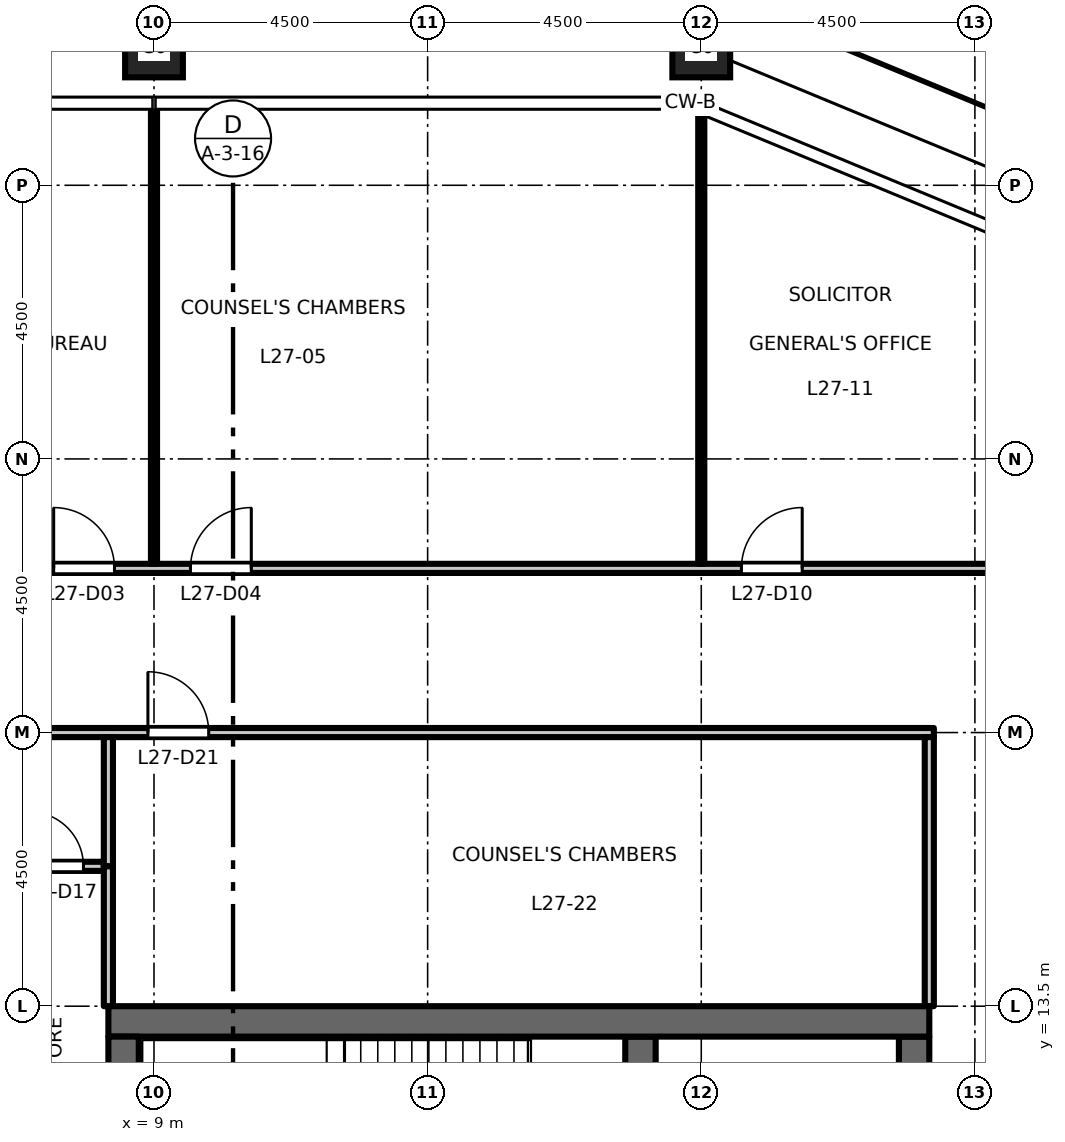
"""IFC4 building model, lengths in metres.
Left out: names, types, materials, properties, quantities, classifications, styles, units other than length and angle.
Written with IfcOpenShell. Run it as: python <this file> out.ifc"""

import sys

from ifc_helpers import new_model, si_unit, direction, frame, frame_2d, origin, origin_2d, place, context, subcontext, project, spatial, rectangle, hollow_rectangle, extrude, element, fill, save


model = new_model("IFC4")
c1 = context("Model", 3, precision=1e-05, world=origin(), true_north=direction((0.0, 1.0)))
c2 = subcontext(c1, "Body", "Model", "MODEL_VIEW")
j1 = project(units=[si_unit("LENGTHUNIT", "METRE"), si_unit("PLANEANGLEUNIT", "RADIAN")], contexts=[c1])
p1 = place(None, origin())
s1 = spatial("IfcSite", under=j1, at=p1, CompositionType="ELEMENT")
p2 = place(p1, origin())
s2 = spatial("IfcBuilding", under=s1, at=p2, CompositionType="ELEMENT")
p3 = place(p2, frame((0.0, 0.0, 127.2)))
s3 = spatial("IfcBuildingStorey", under=s2, at=p3, CompositionType="ELEMENT", Elevation=127.2)
for number, where, z_axis, x_axis in (
    (1, (18.0, 29.25, 0.0), (0.0, 0.0, 1.0), (1.0, 0.0, 0.0)),
    (2, (9.0, 29.25, 0.0), (0.0, 0.0, 1.0), (1.0, 0.0, 0.0)),
):
    element("IfcColumn", number, at=place(p3, frame(where, z_axis=z_axis, x_axis=x_axis)), inside=s3, PredefinedType="COLUMN", context=c2, shape_type="SweptSolid", body=[
        extrude(hollow_rectangle(XDim=0.95, YDim=0.95, WallThickness=0.055, at=origin_2d()), origin(), (0.0, 0.0, 1.0), 4.5),
    ])
p4 = place(p3, frame((21.5, -13.0, 0.0), z_axis=(0.0, 0.0, 1.0), x_axis=(0.0, 1.0, 0.0)))
e3 = element("IfcWall", 3, at=p4, inside=s3, PredefinedType="SHEAR", context=c2, shape_type="SweptSolid", body=[
    extrude(rectangle(XDim=26.0, YDim=0.5, at=frame_2d((13.0, 0.0))), origin(), (0.0, 0.0, 1.0), 4.35),
])
p5 = place(p4, frame((16.825, 0.0, 0.0)))
e4 = element("IfcOpeningElement", 4, at=p5, cuts=e3, PredefinedType="OPENING", context=c2, shape_type="SweptSolid", body=[
    extrude(rectangle(XDim=1.8, YDim=2.1, at=frame_2d((0.9, 1.05))), frame((0.0, 0.26, 0.0), z_axis=(0.0, -1.0, 0.0), x_axis=(1.0, 0.0, 0.0)), (0.0, 0.0, 1.0), 0.52),
])
p6 = place(p4, frame((7.375, 0.0, 0.0)))
e5 = element("IfcOpeningElement", 5, at=p6, cuts=e3, PredefinedType="OPENING", context=c2, shape_type="SweptSolid", body=[
    extrude(rectangle(XDim=1.8, YDim=2.1, at=frame_2d((0.9, 1.05))), frame((0.0, 0.26, 0.0), z_axis=(0.0, -1.0, 0.0), x_axis=(1.0, 0.0, 0.0)), (0.0, 0.0, 1.0), 0.52),
])
p7 = place(p4, frame((1.3, 0.0, 0.0)))
e6 = element("IfcOpeningElement", 6, at=p7, cuts=e3, PredefinedType="OPENING", context=c2, shape_type="SweptSolid", body=[
    extrude(rectangle(XDim=0.9, YDim=2.1, at=frame_2d((0.45, 1.05))), frame((0.0, 0.26, 0.0), z_axis=(0.0, -1.0, 0.0), x_axis=(1.0, 0.0, 0.0)), (0.0, 0.0, 1.0), 0.52),
])
p8 = place(p3, frame((17.0, 6.425, 0.0), z_axis=(0.0, 0.0, 1.0), x_axis=(0.0, 1.0, 0.0)))
e7 = element("IfcWall", 7, at=p8, inside=s3, PredefinedType="SHEAR", context=c2, shape_type="SweptSolid", body=[
    extrude(rectangle(XDim=6.575, YDim=0.5, at=frame_2d((3.288, 0.0))), origin(), (0.0, 0.0, 1.0), 4.35),
])
p9 = place(p3, frame((8.25, 13.25, 0.0), z_axis=(0.0, 0.0, 1.0), x_axis=(1.0, 0.0, 0.0)))
e8 = element("IfcWall", 8, at=p9, inside=s3, PredefinedType="SHEAR", context=c2, shape_type="SweptSolid", body=[
    extrude(rectangle(XDim=13.5, YDim=0.5, at=frame_2d((6.75, 0.0))), origin(), (0.0, 0.0, 1.0), 4.35),
])
p10 = place(p3, frame((8.5, -13.0, 0.0), z_axis=(0.0, 0.0, 1.0), x_axis=(0.0, 1.0, 0.0)))
e9 = element("IfcWall", 9, at=p10, inside=s3, PredefinedType="SHEAR", context=c2, shape_type="SweptSolid", body=[
    extrude(rectangle(XDim=26.0, YDim=0.5, at=frame_2d((13.0, 0.0))), origin(), (0.0, 0.0, 1.0), 4.35),
])
p11 = place(p3, frame((6.54, 15.8, 0.0), z_axis=(0.0, 0.0, 1.0), x_axis=(1.0, 0.0, 0.0)))
e10 = element("IfcWall", 10, at=p11, inside=s3, PredefinedType="PARTITIONING", context=c2, shape_type="SweptSolid", body=[
    extrude(rectangle(XDim=1.635, YDim=0.15, at=frame_2d((0.817, 0.0))), origin(), (0.0, 0.0, 1.0), 4.35),
])
p12 = place(p11, frame((0.4, 0.0, 0.0)))
e11 = element("IfcOpeningElement", 11, at=p12, cuts=e10, PredefinedType="OPENING", context=c2, shape_type="SweptSolid", body=[
    extrude(rectangle(XDim=0.9, YDim=2.1, at=frame_2d((0.45, 1.05))), frame((0.0, 0.085, 0.0), z_axis=(0.0, -1.0, 0.0), x_axis=(1.0, 0.0, 0.0)), (0.0, 0.0, 1.0), 0.17),
])
p13 = place(p3, frame((-21.825, 18.0, 0.0), z_axis=(0.0, 0.0, 1.0), x_axis=(1.0, 0.0, 0.0)))
e12 = element("IfcWall", 12, at=p13, inside=s3, PredefinedType="PARTITIONING", context=c2, shape_type="SweptSolid", body=[
    extrude(rectangle(XDim=43.65, YDim=0.15, at=frame_2d((21.825, 0.0))), origin(), (0.0, 0.0, 1.0), 4.35),
])
p14 = place(p13, frame((14.225, 0.0, 0.0)))
e13 = element("IfcOpeningElement", 13, at=p14, cuts=e12, PredefinedType="OPENING", context=c2, shape_type="SweptSolid", body=[
    extrude(rectangle(XDim=1.0, YDim=2.1, at=frame_2d((0.5, 1.05))), frame((0.0, 0.085, 0.0), z_axis=(0.0, -1.0, 0.0), x_axis=(1.0, 0.0, 0.0)), (0.0, 0.0, 1.0), 0.17),
])
p15 = place(p13, frame((11.975, 0.0, 0.0)))
e14 = element("IfcOpeningElement", 14, at=p15, cuts=e12, PredefinedType="OPENING", context=c2, shape_type="SweptSolid", body=[
    extrude(rectangle(XDim=1.0, YDim=2.1, at=frame_2d((0.5, 1.05))), frame((0.0, 0.085, 0.0), z_axis=(0.0, -1.0, 0.0), x_axis=(1.0, 0.0, 0.0)), (0.0, 0.0, 1.0), 0.17),
])
p16 = place(p13, frame((30.725, 0.0, 0.0)))
e15 = element("IfcOpeningElement", 15, at=p16, cuts=e12, PredefinedType="OPENING", context=c2, shape_type="SweptSolid", body=[
    extrude(rectangle(XDim=1.0, YDim=2.1, at=frame_2d((0.5, 1.05))), frame((0.0, 0.085, 0.0), z_axis=(0.0, -1.0, 0.0), x_axis=(1.0, 0.0, 0.0)), (0.0, 0.0, 1.0), 0.17),
])
p17 = place(p3, frame((-27.06, 20.7, 0.0), z_axis=(0.0, 0.0, 1.0), x_axis=(1.0, 0.0, 0.0)))
e16 = element("IfcWall", 16, at=p17, inside=s3, PredefinedType="PARTITIONING", context=c2, shape_type="SweptSolid", body=[
    extrude(rectangle(XDim=54.12, YDim=0.15, at=frame_2d((27.06, 0.0))), origin(), (0.0, 0.0, 1.0), 4.35),
])
p18 = place(p17, frame((16.41, 0.0, 0.0)))
e17 = element("IfcOpeningElement", 17, at=p18, cuts=e16, PredefinedType="OPENING", context=c2, shape_type="SweptSolid", body=[
    extrude(rectangle(XDim=1.0, YDim=2.1, at=frame_2d((0.5, 1.05))), frame((0.0, 0.085, 0.0), z_axis=(0.0, -1.0, 0.0), x_axis=(1.0, 0.0, 0.0)), (0.0, 0.0, 1.0), 0.17),
])
p19 = place(p17, frame((18.66, 0.0, 0.0)))
e18 = element("IfcOpeningElement", 18, at=p19, cuts=e16, PredefinedType="OPENING", context=c2, shape_type="SweptSolid", body=[
    extrude(rectangle(XDim=1.0, YDim=2.1, at=frame_2d((0.5, 1.05))), frame((0.0, 0.085, 0.0), z_axis=(0.0, -1.0, 0.0), x_axis=(1.0, 0.0, 0.0)), (0.0, 0.0, 1.0), 0.17),
])
p20 = place(p17, frame((34.41, 0.0, 0.0)))
e19 = element("IfcOpeningElement", 19, at=p20, cuts=e16, PredefinedType="OPENING", context=c2, shape_type="SweptSolid", body=[
    extrude(rectangle(XDim=1.0, YDim=2.1, at=frame_2d((0.5, 1.05))), frame((0.0, 0.085, 0.0), z_axis=(0.0, -1.0, 0.0), x_axis=(1.0, 0.0, 0.0)), (0.0, 0.0, 1.0), 0.17),
])
p21 = place(p17, frame((36.66, 0.0, 0.0)))
e20 = element("IfcOpeningElement", 20, at=p21, cuts=e16, PredefinedType="OPENING", context=c2, shape_type="SweptSolid", body=[
    extrude(rectangle(XDim=1.0, YDim=2.1, at=frame_2d((0.5, 1.05))), frame((0.0, 0.085, 0.0), z_axis=(0.0, -1.0, 0.0), x_axis=(1.0, 0.0, 0.0)), (0.0, 0.0, 1.0), 0.17),
])
p22 = place(p17, frame((7.41, 0.0, 0.0)))
e21 = element("IfcOpeningElement", 21, at=p22, cuts=e16, PredefinedType="OPENING", context=c2, shape_type="SweptSolid", body=[
    extrude(rectangle(XDim=1.0, YDim=2.1, at=frame_2d((0.5, 1.05))), frame((0.0, 0.085, 0.0), z_axis=(0.0, -1.0, 0.0), x_axis=(1.0, 0.0, 0.0)), (0.0, 0.0, 1.0), 0.17),
])
p23 = place(p17, frame((45.72, 0.0, 0.0)))
e22 = element("IfcOpeningElement", 22, at=p23, cuts=e16, PredefinedType="OPENING", context=c2, shape_type="SweptSolid", body=[
    extrude(rectangle(XDim=1.0, YDim=2.1, at=frame_2d((0.5, 1.05))), frame((0.0, 0.085, 0.0), z_axis=(0.0, -1.0, 0.0), x_axis=(1.0, 0.0, 0.0)), (0.0, 0.0, 1.0), 0.17),
])
p24 = place(p3, frame((8.25, 15.8, 0.0), z_axis=(0.0, 0.0, 1.0), x_axis=(0.0, 1.0, 0.0)))
e23 = element("IfcWall", 23, at=p24, inside=s3, PredefinedType="PARTITIONING", context=c2, shape_type="SweptSolid", body=[
    extrude(rectangle(XDim=2.125, YDim=0.15, at=frame_2d((1.062, 0.0))), origin(), (0.0, 0.0, 1.0), 4.35),
])
p25 = place(p3, frame((8.25, 13.5, 0.0), z_axis=(0.0, 0.0, 1.0), x_axis=(0.0, 1.0, 0.0)))
e24 = element("IfcWall", 24, at=p25, inside=s3, PredefinedType="PARTITIONING", context=c2, shape_type="SweptSolid", body=[
    extrude(rectangle(XDim=2.3, YDim=0.15, at=frame_2d((1.15, 0.0))), origin(), (0.0, 0.0, 1.0), 4.35),
])
p26 = place(p3, frame((9.0, 20.775, 0.0), z_axis=(0.0, 0.0, 1.0), x_axis=(0.0, 1.0, 0.0)))
e25 = element("IfcWall", 25, at=p26, inside=s3, PredefinedType="PARTITIONING", context=c2, shape_type="SweptSolid", body=[
    extrude(rectangle(XDim=7.485, YDim=0.1, at=frame_2d((3.743, 0.0))), origin(), (0.0, 0.0, 1.0), 3.45),
])
p27 = place(p3, frame((18.0, 20.775, 0.0), z_axis=(0.0, 0.0, 1.0), x_axis=(0.0, 1.0, 0.0)))
e26 = element("IfcWall", 26, at=p27, inside=s3, PredefinedType="PARTITIONING", context=c2, shape_type="SweptSolid", body=[
    extrude(rectangle(XDim=7.403, YDim=0.1, at=frame_2d((3.702, 0.0))), origin(), (0.0, 0.0, 1.0), 3.45),
])
p28 = place(p3, frame((21.75, 13.5, 0.0), z_axis=(0.0, 0.0, 1.0), x_axis=(0.0, 1.0, 0.0)))
e27 = element("IfcWall", 27, at=p28, inside=s3, PredefinedType="PARTITIONING", context=c2, shape_type="SweptSolid", body=[
    extrude(rectangle(XDim=4.425, YDim=0.15, at=frame_2d((2.212, 0.0))), origin(), (0.0, 0.0, 1.0), 4.35),
])
p29 = place(p20, origin())
e28 = element("IfcDoor", 28, at=p29, inside=s3, OperationType="SINGLE_SWING_LEFT", PredefinedType="DOOR", context=c2, shape_type="SweptSolid", body=[
    extrude(rectangle(XDim=1.0, YDim=2.1, at=frame_2d((0.5, 1.05))), frame((0.0, 0.025, 0.0), z_axis=(0.0, -1.0, 0.0), x_axis=(1.0, 0.0, 0.0)), (0.0, 0.0, 1.0), 0.05),
])
fill(e19, e28)
p30 = place(p21, origin())
e29 = element("IfcDoor", 29, at=p30, inside=s3, OperationType="SINGLE_SWING_RIGHT", PredefinedType="DOOR", context=c2, shape_type="SweptSolid", body=[
    extrude(rectangle(XDim=1.0, YDim=2.1, at=frame_2d((0.5, 1.05))), frame((0.0, 0.025, 0.0), z_axis=(0.0, -1.0, 0.0), x_axis=(1.0, 0.0, 0.0)), (0.0, 0.0, 1.0), 0.05),
])
fill(e20, e29)
p31 = place(p23, origin())
e30 = element("IfcDoor", 30, at=p31, inside=s3, OperationType="SINGLE_SWING_RIGHT", PredefinedType="DOOR", context=c2, shape_type="SweptSolid", body=[
    extrude(rectangle(XDim=1.0, YDim=2.1, at=frame_2d((0.5, 1.05))), frame((0.0, 0.025, 0.0), z_axis=(0.0, -1.0, 0.0), x_axis=(1.0, 0.0, 0.0)), (0.0, 0.0, 1.0), 0.05),
])
fill(e22, e30)
p32 = place(p12, origin())
e31 = element("IfcDoor", 31, at=p32, inside=s3, OperationType="SINGLE_SWING_LEFT", PredefinedType="DOOR", context=c2, shape_type="SweptSolid", body=[
    extrude(rectangle(XDim=0.9, YDim=2.1, at=frame_2d((0.45, 1.05))), frame((0.0, 0.025, 0.0), z_axis=(0.0, -1.0, 0.0), x_axis=(1.0, 0.0, 0.0)), (0.0, 0.0, 1.0), 0.05),
])
fill(e11, e31)
p33 = place(p16, origin())
e32 = element("IfcDoor", 32, at=p33, inside=s3, OperationType="SINGLE_SWING_LEFT", PredefinedType="DOOR", context=c2, shape_type="SweptSolid", body=[
    extrude(rectangle(XDim=1.0, YDim=2.1, at=frame_2d((0.5, 1.05))), frame((0.0, 0.025, 0.0), z_axis=(0.0, -1.0, 0.0), x_axis=(1.0, 0.0, 0.0)), (0.0, 0.0, 1.0), 0.05),
])
fill(e15, e32)
save(model, sys.argv[1])
